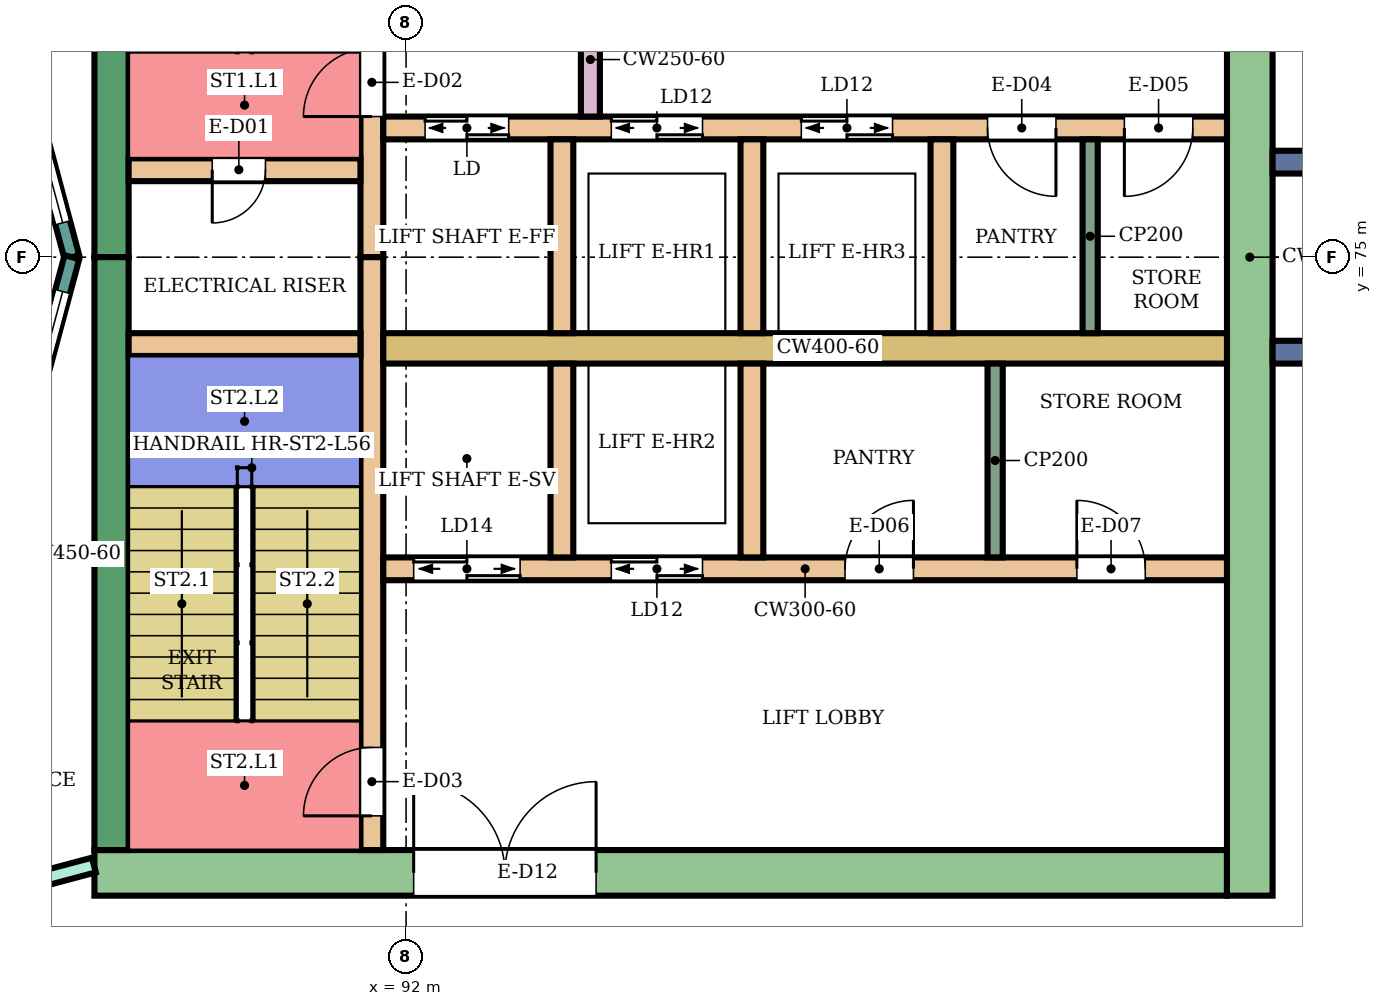
"""IFC4 building model, lengths in metres.
Left out: names, types, materials, properties, quantities, classifications, styles, units other than length and angle.
Written with IfcOpenShell. Run it as: python <this file> out.ifc"""

import sys

from ifc_helpers import new_model, si_unit, direction, frame, frame_2d, origin, place, context, subcontext, project, spatial, rectangle, extrude, element, fill, save


model = new_model("IFC4")
c1 = context("Model", 3, precision=1e-05, world=origin(), true_north=direction((0.0, 1.0)))
c2 = subcontext(c1, "Body", "Model", "MODEL_VIEW")
j1 = project(units=[si_unit("LENGTHUNIT", "METRE"), si_unit("PLANEANGLEUNIT", "RADIAN")], contexts=[c1])
p1 = place(None, origin())
s1 = spatial("IfcSite", under=j1, at=p1, CompositionType="ELEMENT")
p2 = place(p1, origin())
s2 = spatial("IfcBuilding", under=s1, at=p2, CompositionType="ELEMENT")
p3 = place(p2, frame((0.0, 0.0, 245.7)))
s3 = spatial("IfcBuildingStorey", under=s2, at=p3, CompositionType="ELEMENT", Elevation=245.7)
p4 = place(p3, frame((87.9, 66.9, 0.0), z_axis=(0.0, 0.0, 1.0), x_axis=(1.0, 0.0, 0.0)))
e1 = element("IfcWall", 1, at=p4, inside=s3, PredefinedType="SHEAR", context=c2, shape_type="SweptSolid", body=[
    extrude(rectangle(XDim=14.9, YDim=0.6, at=frame_2d((7.45, 0.0))), origin(), (0.0, 0.0, 1.0), 3.88),
])
p5 = place(p4, frame((4.2, 0.0, 0.0)))
e2 = element("IfcOpeningElement", 2, at=p5, cuts=e1, PredefinedType="OPENING", context=c2, shape_type="SweptSolid", body=[
    extrude(rectangle(XDim=2.4, YDim=2.4, at=frame_2d((1.2, 1.2))), frame((0.0, 0.31, 0.0), z_axis=(0.0, -1.0, 0.0), x_axis=(1.0, 0.0, 0.0)), (0.0, 0.0, 1.0), 0.62),
])
for number, where, z_axis, x_axis in (
    (3, (88.125, 75.0, 0.0), (0.0, 0.0, 1.0), (0.0, 1.0, 0.0)),
    (4, (88.125, 67.2, 0.0), (0.0, 0.0, 1.0), (0.0, 1.0, 0.0)),
):
    element("IfcWall", number, at=place(p3, frame(where, z_axis=z_axis, x_axis=x_axis)), inside=s3, PredefinedType="SHEAR", context=c2, shape_type="SweptSolid", body=[
        extrude(rectangle(XDim=7.8, YDim=0.45, at=frame_2d((3.9, 0.0))), origin(), (0.0, 0.0, 1.0), 3.88),
    ])
p6 = place(p3, frame((103.1, 66.6, 0.0), z_axis=(0.0, 0.0, 1.0), x_axis=(0.0, 1.0, 0.0)))
e5 = element("IfcWall", 5, at=p6, inside=s3, PredefinedType="SHEAR", context=c2, shape_type="SweptSolid", body=[
    extrude(rectangle(XDim=16.8, YDim=0.6, at=frame_2d((8.4, 0.0))), origin(), (0.0, 0.0, 1.0), 3.88),
])
p7 = place(p3, frame((91.55, 75.0, 0.0), z_axis=(0.0, 0.0, 1.0), x_axis=(0.0, 1.0, 0.0)))
e6 = element("IfcWall", 6, at=p7, inside=s3, PredefinedType="SHEAR", context=c2, shape_type="SweptSolid", body=[
    extrude(rectangle(XDim=7.8, YDim=0.3, at=frame_2d((3.9, 0.0))), origin(), (0.0, 0.0, 1.0), 3.88),
])
p8 = place(p7, frame((1.85, 0.0, 0.0)))
e7 = element("IfcOpeningElement", 7, at=p8, cuts=e6, PredefinedType="OPENING", context=c2, shape_type="SweptSolid", body=[
    extrude(rectangle(XDim=0.9, YDim=2.1, at=frame_2d((0.45, 1.05))), frame((0.0, 0.16, 0.0), z_axis=(0.0, -1.0, 0.0), x_axis=(1.0, 0.0, 0.0)), (0.0, 0.0, 1.0), 0.32),
])
p9 = place(p3, frame((91.55, 67.2, 0.0), z_axis=(0.0, 0.0, 1.0), x_axis=(0.0, 1.0, 0.0)))
e8 = element("IfcWall", 8, at=p9, inside=s3, PredefinedType="SHEAR", context=c2, shape_type="SweptSolid", body=[
    extrude(rectangle(XDim=7.8, YDim=0.3, at=frame_2d((3.9, 0.0))), origin(), (0.0, 0.0, 1.0), 3.88),
])
p10 = place(p9, frame((0.45, 0.0, 0.0)))
e9 = element("IfcOpeningElement", 9, at=p10, cuts=e8, PredefinedType="OPENING", context=c2, shape_type="SweptSolid", body=[
    extrude(rectangle(XDim=0.9, YDim=2.1, at=frame_2d((0.45, 1.05))), frame((0.0, 0.16, 0.0), z_axis=(0.0, -1.0, 0.0), x_axis=(1.0, 0.0, 0.0)), (0.0, 0.0, 1.0), 0.32),
])
p11 = place(p3, frame((88.35, 76.15, 0.0), z_axis=(0.0, 0.0, 1.0), x_axis=(1.0, 0.0, 0.0)))
e10 = element("IfcWall", 10, at=p11, inside=s3, PredefinedType="SHEAR", context=c2, shape_type="SweptSolid", body=[
    extrude(rectangle(XDim=3.05, YDim=0.3, at=frame_2d((1.525, 0.0))), origin(), (0.0, 0.0, 1.0), 3.88),
])
p12 = place(p11, frame((1.1, 0.0, 0.0)))
e11 = element("IfcOpeningElement", 11, at=p12, cuts=e10, PredefinedType="OPENING", context=c2, shape_type="SweptSolid", body=[
    extrude(rectangle(XDim=0.7, YDim=2.0, at=frame_2d((0.35, 1.0))), frame((0.0, 0.16, 0.0), z_axis=(0.0, -1.0, 0.0), x_axis=(1.0, 0.0, 0.0)), (0.0, 0.0, 1.0), 0.32),
])
p13 = place(p3, frame((88.35, 73.85, 0.0), z_axis=(0.0, 0.0, 1.0), x_axis=(1.0, 0.0, 0.0)))
e12 = element("IfcWall", 12, at=p13, inside=s3, PredefinedType="SHEAR", context=c2, shape_type="SweptSolid", body=[
    extrude(rectangle(XDim=3.05, YDim=0.3, at=frame_2d((1.525, 0.0))), origin(), (0.0, 0.0, 1.0), 3.88),
])
p14 = place(p3, frame((91.7, 76.7, 0.0), z_axis=(0.0, 0.0, 1.0), x_axis=(1.0, 0.0, 0.0)))
e13 = element("IfcWall", 13, at=p14, inside=s3, PredefinedType="SHEAR", context=c2, shape_type="SweptSolid", body=[
    extrude(rectangle(XDim=11.1, YDim=0.3, at=frame_2d((5.55, 0.0))), origin(), (0.0, 0.0, 1.0), 3.88),
])
p15 = place(p14, frame((0.55, 0.0, 0.0)))
e14 = element("IfcOpeningElement", 14, at=p15, cuts=e13, PredefinedType="OPENING", context=c2, shape_type="SweptSolid", body=[
    extrude(rectangle(XDim=1.1, YDim=2.1, at=frame_2d((0.55, 1.05))), frame((0.0, 0.16, 0.0), z_axis=(0.0, -1.0, 0.0), x_axis=(1.0, 0.0, 0.0)), (0.0, 0.0, 1.0), 0.32),
])
p16 = place(p14, frame((3.0, 0.0, 0.0)))
e15 = element("IfcOpeningElement", 15, at=p16, cuts=e13, PredefinedType="OPENING", context=c2, shape_type="SweptSolid", body=[
    extrude(rectangle(XDim=1.2, YDim=2.1, at=frame_2d((0.6, 1.05))), frame((0.0, 0.16, 0.0), z_axis=(0.0, -1.0, 0.0), x_axis=(1.0, 0.0, 0.0)), (0.0, 0.0, 1.0), 0.32),
])
p17 = place(p14, frame((5.5, 0.0, 0.0)))
e16 = element("IfcOpeningElement", 16, at=p17, cuts=e13, PredefinedType="OPENING", context=c2, shape_type="SweptSolid", body=[
    extrude(rectangle(XDim=1.2, YDim=2.1, at=frame_2d((0.6, 1.05))), frame((0.0, 0.16, 0.0), z_axis=(0.0, -1.0, 0.0), x_axis=(1.0, 0.0, 0.0)), (0.0, 0.0, 1.0), 0.32),
])
p18 = place(p14, frame((7.95, 0.0, 0.0)))
e17 = element("IfcOpeningElement", 17, at=p18, cuts=e13, PredefinedType="OPENING", context=c2, shape_type="SweptSolid", body=[
    extrude(rectangle(XDim=0.9, YDim=2.1, at=frame_2d((0.45, 1.05))), frame((0.0, 0.16, 0.0), z_axis=(0.0, -1.0, 0.0), x_axis=(1.0, 0.0, 0.0)), (0.0, 0.0, 1.0), 0.32),
])
p19 = place(p14, frame((9.75, 0.0, 0.0)))
e18 = element("IfcOpeningElement", 18, at=p19, cuts=e13, PredefinedType="OPENING", context=c2, shape_type="SweptSolid", body=[
    extrude(rectangle(XDim=0.9, YDim=2.1, at=frame_2d((0.45, 1.05))), frame((0.0, 0.16, 0.0), z_axis=(0.0, -1.0, 0.0), x_axis=(1.0, 0.0, 0.0)), (0.0, 0.0, 1.0), 0.32),
])
p20 = place(p3, frame((91.7, 73.8, 0.0), z_axis=(0.0, 0.0, 1.0), x_axis=(1.0, 0.0, 0.0)))
e19 = element("IfcWall", 19, at=p20, inside=s3, PredefinedType="SHEAR", context=c2, shape_type="SweptSolid", body=[
    extrude(rectangle(XDim=11.1, YDim=0.4, at=frame_2d((5.55, 0.0))), origin(), (0.0, 0.0, 1.0), 3.88),
])
p21 = place(p3, frame((91.7, 70.9, 0.0), z_axis=(0.0, 0.0, 1.0), x_axis=(1.0, 0.0, 0.0)))
e20 = element("IfcWall", 20, at=p21, inside=s3, PredefinedType="SHEAR", context=c2, shape_type="SweptSolid", body=[
    extrude(rectangle(XDim=11.1, YDim=0.3, at=frame_2d((5.55, 0.0))), origin(), (0.0, 0.0, 1.0), 3.88),
])
p22 = place(p21, frame((0.4, 0.0, 0.0)))
e21 = element("IfcOpeningElement", 21, at=p22, cuts=e20, PredefinedType="OPENING", context=c2, shape_type="SweptSolid", body=[
    extrude(rectangle(XDim=1.4, YDim=2.1, at=frame_2d((0.7, 1.05))), frame((0.0, 0.16, 0.0), z_axis=(0.0, -1.0, 0.0), x_axis=(1.0, 0.0, 0.0)), (0.0, 0.0, 1.0), 0.32),
])
p23 = place(p21, frame((3.0, 0.0, 0.0)))
e22 = element("IfcOpeningElement", 22, at=p23, cuts=e20, PredefinedType="OPENING", context=c2, shape_type="SweptSolid", body=[
    extrude(rectangle(XDim=1.2, YDim=2.1, at=frame_2d((0.6, 1.05))), frame((0.0, 0.16, 0.0), z_axis=(0.0, -1.0, 0.0), x_axis=(1.0, 0.0, 0.0)), (0.0, 0.0, 1.0), 0.32),
])
p24 = place(p21, frame((6.075, 0.0, 0.0)))
e23 = element("IfcOpeningElement", 23, at=p24, cuts=e20, PredefinedType="OPENING", context=c2, shape_type="SweptSolid", body=[
    extrude(rectangle(XDim=0.9, YDim=2.1, at=frame_2d((0.45, 1.05))), frame((0.0, 0.16, 0.0), z_axis=(0.0, -1.0, 0.0), x_axis=(1.0, 0.0, 0.0)), (0.0, 0.0, 1.0), 0.32),
])
p25 = place(p21, frame((9.125, 0.0, 0.0)))
e24 = element("IfcOpeningElement", 24, at=p25, cuts=e20, PredefinedType="OPENING", context=c2, shape_type="SweptSolid", body=[
    extrude(rectangle(XDim=0.9, YDim=2.1, at=frame_2d((0.45, 1.05))), frame((0.0, 0.16, 0.0), z_axis=(0.0, -1.0, 0.0), x_axis=(1.0, 0.0, 0.0)), (0.0, 0.0, 1.0), 0.32),
])
for number, where, z_axis, x_axis in (
    (25, (94.05, 74.0, 0.0), (0.0, 0.0, 1.0), (0.0, 1.0, 0.0)),
    (26, (96.55, 74.0, 0.0), (0.0, 0.0, 1.0), (0.0, 1.0, 0.0)),
    (27, (99.05, 74.0, 0.0), (0.0, 0.0, 1.0), (0.0, 1.0, 0.0)),
    (28, (94.05, 71.05, 0.0), (0.0, 0.0, 1.0), (0.0, 1.0, 0.0)),
    (29, (96.55, 71.05, 0.0), (0.0, 0.0, 1.0), (0.0, 1.0, 0.0)),
):
    element("IfcWall", number, at=place(p3, frame(where, z_axis=z_axis, x_axis=x_axis)), inside=s3, PredefinedType="SHEAR", context=c2, shape_type="SweptSolid", body=[
        extrude(rectangle(XDim=2.55, YDim=0.3, at=frame_2d((1.275, 0.0))), origin(), (0.0, 0.0, 1.0), 3.88),
    ])
p26 = place(p3, frame((94.425, 76.85, 0.0), z_axis=(0.0, 0.0, 1.0), x_axis=(0.0, 1.0, 0.0)))
e30 = element("IfcWall", 30, at=p26, inside=s3, PredefinedType="SHEAR", context=c2, shape_type="SweptSolid", body=[
    extrude(rectangle(XDim=1.5, YDim=0.25, at=frame_2d((0.75, 0.0))), origin(), (0.0, 0.0, 1.0), 3.88),
])
for number, where, z_axis, x_axis in (
    (31, (103.4, 73.75, 0.0), (0.0, 0.0, 1.0), (1.0, 0.0, 0.0)),
    (32, (103.4, 76.25, 0.0), (0.0, 0.0, 1.0), (1.0, 0.0, 0.0)),
):
    element("IfcWall", number, at=place(p3, frame(where, z_axis=z_axis, x_axis=x_axis)), inside=s3, PredefinedType="NOTDEFINED", context=c2, shape_type="SweptSolid", body=[
        extrude(rectangle(XDim=2.416, YDim=0.3, at=frame_2d((1.208, 0.0))), origin(), (0.0, 0.0, 1.0), 4.2),
    ])
p27 = place(p3, frame((87.604, 75.0, 0.0), z_axis=(0.0, 0.0, 1.0), x_axis=(-0.258789828301, 0.965933654434, 0.0)))
e33 = element("IfcWall", 33, at=p27, inside=s3, PredefinedType="NOTDEFINED", context=c2, shape_type="SweptSolid", body=[
    extrude(rectangle(XDim=3.936, YDim=0.2, at=frame_2d((1.968, 0.0))), origin(), (0.0, 0.0, 1.0), 4.2),
])
p28 = place(p27, frame((0.468, 0.0, 0.9)))
e34 = element("IfcOpeningElement", 34, at=p28, cuts=e33, PredefinedType="OPENING", context=c2, shape_type="SweptSolid", body=[
    extrude(rectangle(XDim=3.0, YDim=2.3, at=frame_2d((1.5, 1.15))), frame((0.0, 0.11, 0.0), z_axis=(0.0, -1.0, 0.0), x_axis=(1.0, 0.0, 0.0)), (0.0, 0.0, 1.0), 0.22),
])
p29 = place(p3, frame((86.585, 71.198, 0.0), z_axis=(0.0, 0.0, 1.0), x_axis=(0.258789828301, 0.965933654434, 0.0)))
e35 = element("IfcWall", 35, at=p29, inside=s3, PredefinedType="NOTDEFINED", context=c2, shape_type="SweptSolid", body=[
    extrude(rectangle(XDim=3.936, YDim=0.2, at=frame_2d((1.968, 0.0))), origin(), (0.0, 0.0, 1.0), 4.2),
])
p30 = place(p29, frame((0.468, 0.0, 0.9)))
e36 = element("IfcOpeningElement", 36, at=p30, cuts=e35, PredefinedType="OPENING", context=c2, shape_type="SweptSolid", body=[
    extrude(rectangle(XDim=3.0, YDim=2.3, at=frame_2d((1.5, 1.15))), frame((0.0, 0.11, 0.0), z_axis=(0.0, -1.0, 0.0), x_axis=(1.0, 0.0, 0.0)), (0.0, 0.0, 1.0), 0.22),
])
p31 = place(p3, frame((80.125, 64.932, 0.0), z_axis=(0.0, 0.0, 1.0), x_axis=(0.966236955806, 0.257655089674, 0.0)))
e37 = element("IfcWall", 37, at=p31, inside=s3, PredefinedType="PARTITIONING", context=c2, shape_type="SweptSolid", body=[
    extrude(rectangle(XDim=8.039, YDim=0.2, at=frame_2d((4.02, 0.0))), origin(), (0.0, 0.0, 1.0), 3.75),
])
p32 = place(p31, frame((6.298, 0.0, 0.0)))
e38 = element("IfcOpeningElement", 38, at=p32, cuts=e37, PredefinedType="OPENING", context=c2, shape_type="SweptSolid", body=[
    extrude(rectangle(XDim=0.9, YDim=2.1, at=frame_2d((0.45, 1.05))), frame((0.0, 0.11, 0.0), z_axis=(0.0, -1.0, 0.0), x_axis=(1.0, 0.0, 0.0)), (0.0, 0.0, 1.0), 0.22),
])
p33 = place(p31, frame((2.045, 0.0, 0.0)))
e39 = element("IfcOpeningElement", 39, at=p33, cuts=e37, PredefinedType="OPENING", context=c2, shape_type="SweptSolid", body=[
    extrude(rectangle(XDim=0.9, YDim=2.1, at=frame_2d((0.45, 1.05))), frame((0.0, 0.11, 0.0), z_axis=(0.0, -1.0, 0.0), x_axis=(1.0, 0.0, 0.0)), (0.0, 0.0, 1.0), 0.22),
])
for number, where, z_axis, x_axis in (
    (40, (101.0, 74.0, 0.0), (0.0, 0.0, 1.0), (0.0, 1.0, 0.0)),
    (41, (99.75, 71.05, 0.0), (0.0, 0.0, 1.0), (0.0, 1.0, 0.0)),
):
    element("IfcWall", number, at=place(p3, frame(where, z_axis=z_axis, x_axis=x_axis)), inside=s3, PredefinedType="PARTITIONING", context=c2, shape_type="SweptSolid", body=[
        extrude(rectangle(XDim=2.55, YDim=0.2, at=frame_2d((1.275, 0.0))), origin(), (0.0, 0.0, 1.0), 3.88),
    ])
p34 = place(p28, origin())
e42 = element("IfcWindow", 42, at=p34, inside=s3, PartitioningType="SINGLE_PANEL", PredefinedType="WINDOW", context=c2, shape_type="SweptSolid", body=[
    extrude(rectangle(XDim=3.0, YDim=2.3, at=frame_2d((1.5, 1.15))), frame((0.0, 0.03, 0.0), z_axis=(0.0, -1.0, 0.0), x_axis=(1.0, 0.0, 0.0)), (0.0, 0.0, 1.0), 0.06),
])
fill(e34, e42)
p35 = place(p30, origin())
e43 = element("IfcWindow", 43, at=p35, inside=s3, PartitioningType="SINGLE_PANEL", PredefinedType="WINDOW", context=c2, shape_type="SweptSolid", body=[
    extrude(rectangle(XDim=3.0, YDim=2.3, at=frame_2d((1.5, 1.15))), frame((0.0, 0.03, 0.0), z_axis=(0.0, -1.0, 0.0), x_axis=(1.0, 0.0, 0.0)), (0.0, 0.0, 1.0), 0.06),
])
fill(e36, e43)
p36 = place(p12, frame((0.7, 0.0, 0.0), z_axis=(0.0, 0.0, 1.0), x_axis=(-1.0, 0.0, 0.0)))
e44 = element("IfcDoor", 44, at=p36, inside=s3, OperationType="SINGLE_SWING_RIGHT", PredefinedType="DOOR", context=c2, shape_type="SweptSolid", body=[
    extrude(rectangle(XDim=0.7, YDim=2.0, at=frame_2d((0.35, 1.0))), frame((0.0, 0.025, 0.0), z_axis=(0.0, -1.0, 0.0), x_axis=(1.0, 0.0, 0.0)), (0.0, 0.0, 1.0), 0.05),
])
fill(e11, e44)
p37 = place(p8, origin())
e45 = element("IfcDoor", 45, at=p37, inside=s3, OperationType="SINGLE_SWING_LEFT", PredefinedType="DOOR", context=c2, shape_type="SweptSolid", body=[
    extrude(rectangle(XDim=0.9, YDim=2.1, at=frame_2d((0.45, 1.05))), frame((0.0, 0.025, 0.0), z_axis=(0.0, -1.0, 0.0), x_axis=(1.0, 0.0, 0.0)), (0.0, 0.0, 1.0), 0.05),
])
fill(e7, e45)
p38 = place(p10, origin())
e46 = element("IfcDoor", 46, at=p38, inside=s3, OperationType="SINGLE_SWING_LEFT", PredefinedType="DOOR", context=c2, shape_type="SweptSolid", body=[
    extrude(rectangle(XDim=0.9, YDim=2.1, at=frame_2d((0.45, 1.05))), frame((0.0, 0.025, 0.0), z_axis=(0.0, -1.0, 0.0), x_axis=(1.0, 0.0, 0.0)), (0.0, 0.0, 1.0), 0.05),
])
fill(e9, e46)
p39 = place(p15, origin())
e47 = element("IfcDoor", 47, at=p39, inside=s3, OperationType="DOUBLE_DOOR_SLIDING", PredefinedType="DOOR", context=c2, shape_type="SweptSolid", body=[
    extrude(rectangle(XDim=1.1, YDim=2.1, at=frame_2d((0.55, 1.05))), frame((0.0, 0.025, 0.0), z_axis=(0.0, -1.0, 0.0), x_axis=(1.0, 0.0, 0.0)), (0.0, 0.0, 1.0), 0.05),
])
fill(e14, e47)
p40 = place(p16, origin())
e48 = element("IfcDoor", 48, at=p40, inside=s3, OperationType="DOUBLE_DOOR_SLIDING", PredefinedType="DOOR", context=c2, shape_type="SweptSolid", body=[
    extrude(rectangle(XDim=1.2, YDim=2.1, at=frame_2d((0.6, 1.05))), frame((0.0, 0.025, 0.0), z_axis=(0.0, -1.0, 0.0), x_axis=(1.0, 0.0, 0.0)), (0.0, 0.0, 1.0), 0.05),
])
fill(e15, e48)
p41 = place(p17, origin())
e49 = element("IfcDoor", 49, at=p41, inside=s3, OperationType="DOUBLE_DOOR_SLIDING", PredefinedType="DOOR", context=c2, shape_type="SweptSolid", body=[
    extrude(rectangle(XDim=1.2, YDim=2.1, at=frame_2d((0.6, 1.05))), frame((0.0, 0.025, 0.0), z_axis=(0.0, -1.0, 0.0), x_axis=(1.0, 0.0, 0.0)), (0.0, 0.0, 1.0), 0.05),
])
fill(e16, e49)
p42 = place(p18, frame((0.9, 0.0, 0.0), z_axis=(0.0, 0.0, 1.0), x_axis=(-1.0, 0.0, 0.0)))
e50 = element("IfcDoor", 50, at=p42, inside=s3, OperationType="SINGLE_SWING_LEFT", PredefinedType="DOOR", context=c2, shape_type="SweptSolid", body=[
    extrude(rectangle(XDim=0.9, YDim=2.1, at=frame_2d((0.45, 1.05))), frame((0.0, 0.025, 0.0), z_axis=(0.0, -1.0, 0.0), x_axis=(1.0, 0.0, 0.0)), (0.0, 0.0, 1.0), 0.05),
])
fill(e17, e50)
p43 = place(p19, frame((0.9, 0.0, 0.0), z_axis=(0.0, 0.0, 1.0), x_axis=(-1.0, 0.0, 0.0)))
e51 = element("IfcDoor", 51, at=p43, inside=s3, OperationType="SINGLE_SWING_RIGHT", PredefinedType="DOOR", context=c2, shape_type="SweptSolid", body=[
    extrude(rectangle(XDim=0.9, YDim=2.1, at=frame_2d((0.45, 1.05))), frame((0.0, 0.025, 0.0), z_axis=(0.0, -1.0, 0.0), x_axis=(1.0, 0.0, 0.0)), (0.0, 0.0, 1.0), 0.05),
])
fill(e18, e51)
p44 = place(p22, origin())
e52 = element("IfcDoor", 52, at=p44, inside=s3, OperationType="DOUBLE_DOOR_SLIDING", PredefinedType="DOOR", context=c2, shape_type="SweptSolid", body=[
    extrude(rectangle(XDim=1.4, YDim=2.1, at=frame_2d((0.7, 1.05))), frame((0.0, 0.025, 0.0), z_axis=(0.0, -1.0, 0.0), x_axis=(1.0, 0.0, 0.0)), (0.0, 0.0, 1.0), 0.05),
])
fill(e21, e52)
p45 = place(p23, origin())
e53 = element("IfcDoor", 53, at=p45, inside=s3, OperationType="DOUBLE_DOOR_SLIDING", PredefinedType="DOOR", context=c2, shape_type="SweptSolid", body=[
    extrude(rectangle(XDim=1.2, YDim=2.1, at=frame_2d((0.6, 1.05))), frame((0.0, 0.025, 0.0), z_axis=(0.0, -1.0, 0.0), x_axis=(1.0, 0.0, 0.0)), (0.0, 0.0, 1.0), 0.05),
])
fill(e22, e53)
p46 = place(p24, origin())
e54 = element("IfcDoor", 54, at=p46, inside=s3, OperationType="SINGLE_SWING_RIGHT", PredefinedType="DOOR", context=c2, shape_type="SweptSolid", body=[
    extrude(rectangle(XDim=0.9, YDim=2.1, at=frame_2d((0.45, 1.05))), frame((0.0, 0.025, 0.0), z_axis=(0.0, -1.0, 0.0), x_axis=(1.0, 0.0, 0.0)), (0.0, 0.0, 1.0), 0.05),
])
fill(e23, e54)
p47 = place(p25, origin())
e55 = element("IfcDoor", 55, at=p47, inside=s3, OperationType="SINGLE_SWING_LEFT", PredefinedType="DOOR", context=c2, shape_type="SweptSolid", body=[
    extrude(rectangle(XDim=0.9, YDim=2.1, at=frame_2d((0.45, 1.05))), frame((0.0, 0.025, 0.0), z_axis=(0.0, -1.0, 0.0), x_axis=(1.0, 0.0, 0.0)), (0.0, 0.0, 1.0), 0.05),
])
fill(e24, e55)
p48 = place(p5, origin())
e56 = element("IfcDoor", 56, at=p48, inside=s3, OperationType="DOUBLE_DOOR_SINGLE_SWING", PredefinedType="DOOR", context=c2, shape_type="SweptSolid", body=[
    extrude(rectangle(XDim=2.4, YDim=2.4, at=frame_2d((1.2, 1.2))), frame((0.0, 0.025, 0.0), z_axis=(0.0, -1.0, 0.0), x_axis=(1.0, 0.0, 0.0)), (0.0, 0.0, 1.0), 0.05),
])
fill(e2, e56)
save(model, sys.argv[1])
